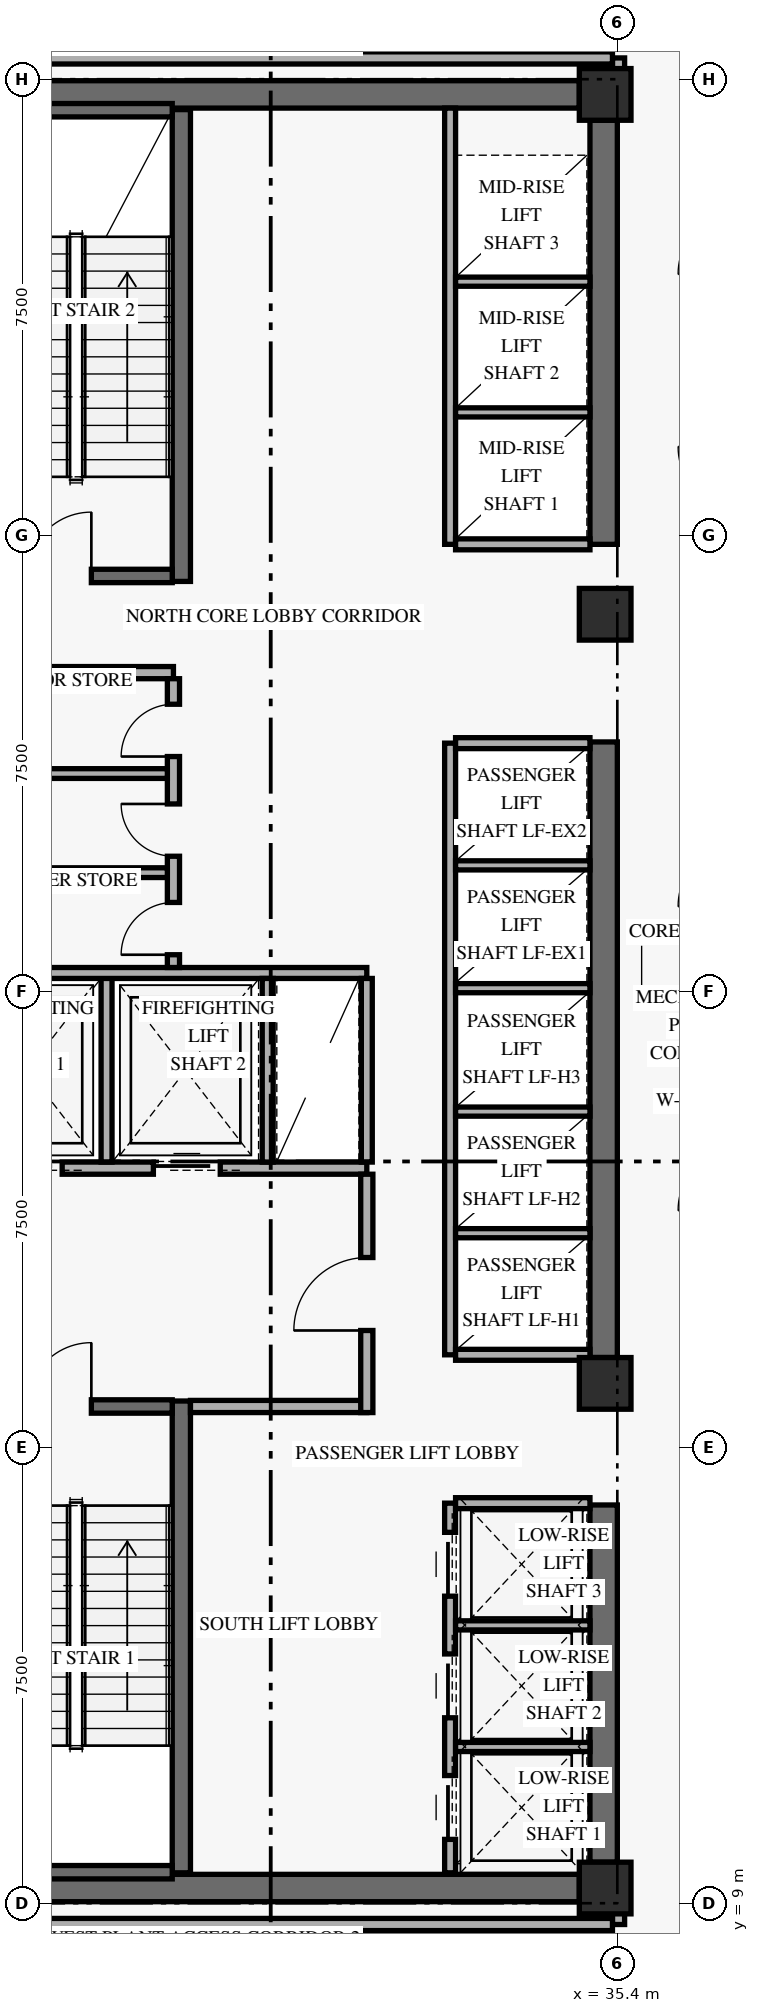
"""IFC4 building model, lengths in metres.
Left out: names, types, materials, properties, quantities, classifications, styles, units other than length and angle.
Written with IfcOpenShell. Run it as: python <this file> out.ifc"""

import sys

from ifc_helpers import new_model, si_unit, direction, frame, frame_2d, origin, origin_2d, place, context, subcontext, project, spatial, rectangle, extrude, element, fill, save


model = new_model("IFC4")
c1 = context("Model", 3, precision=1e-05, world=origin(), true_north=direction((0.0, 1.0)))
c2 = subcontext(c1, "Body", "Model", "MODEL_VIEW")
j1 = project(units=[si_unit("LENGTHUNIT", "METRE"), si_unit("PLANEANGLEUNIT", "RADIAN")], contexts=[c1])
p1 = place(None, origin())
s1 = spatial("IfcSite", under=j1, at=p1, CompositionType="ELEMENT")
p2 = place(p1, origin())
s2 = spatial("IfcBuilding", under=s1, at=p2, CompositionType="ELEMENT")
p3 = place(p2, frame((0.0, 0.0, 71.4)))
s3 = spatial("IfcBuildingStorey", under=s2, at=p3, CompositionType="ELEMENT", Elevation=71.4)
p4 = place(p3, frame((35.175, 9.675, 0.0), z_axis=(0.0, 0.0, 1.0), x_axis=(0.0, 1.0, 0.0)))
e1 = element("IfcWall", 1, at=p4, inside=s3, PredefinedType="SHEAR", context=c2, shape_type="SweptSolid", body=[
    extrude(rectangle(XDim=5.875, YDim=0.45, at=frame_2d((2.938, 0.0))), origin(), (0.0, 0.0, 1.0), 4.297),
])
p5 = place(p3, frame((35.175, 17.975, 0.0), z_axis=(0.0, 0.0, 1.0), x_axis=(0.0, 1.0, 0.0)))
e2 = element("IfcWall", 2, at=p5, inside=s3, PredefinedType="SHEAR", context=c2, shape_type="SweptSolid", body=[
    extrude(rectangle(XDim=10.125, YDim=0.45, at=frame_2d((5.062, 0.0))), origin(), (0.0, 0.0, 1.0), 4.297),
])
p6 = place(p3, frame((35.175, 31.35, 0.0), z_axis=(0.0, 0.0, 1.0), x_axis=(0.0, 1.0, 0.0)))
e3 = element("IfcWall", 3, at=p6, inside=s3, PredefinedType="SHEAR", context=c2, shape_type="SweptSolid", body=[
    extrude(rectangle(XDim=6.975, YDim=0.45, at=frame_2d((3.487, 0.0))), origin(), (0.0, 0.0, 1.0), 4.297),
])
for number, where, z_axis, x_axis in (
    (4, (24.625, 9.25, 0.0), (0.0, 0.0, 1.0), (1.0, 0.0, 0.0)),
    (5, (24.625, 38.75, 0.0), (0.0, 0.0, 1.0), (1.0, 0.0, 0.0)),
):
    element("IfcWall", number, at=place(p3, frame(where, z_axis=z_axis, x_axis=x_axis)), inside=s3, PredefinedType="SHEAR", context=c2, shape_type="SweptSolid", body=[
        extrude(rectangle(XDim=10.15, YDim=0.45, at=frame_2d((5.075, 0.0))), origin(), (0.0, 0.0, 1.0), 4.99),
    ])
p7 = place(p3, frame((28.23, 9.5, 0.0), z_axis=(0.0, 0.0, 1.0), x_axis=(0.0, 1.0, 0.0)))
e6 = element("IfcWall", 6, at=p7, inside=s3, PredefinedType="SHEAR", context=c2, shape_type="SweptSolid", body=[
    extrude(rectangle(XDim=7.76, YDim=0.3, at=frame_2d((3.88, 0.0))), origin(), (0.0, 0.0, 1.0), 4.99),
])
p8 = place(p3, frame((24.92, 9.51, 0.0), z_axis=(0.0, 0.0, 1.0), x_axis=(1.0, 0.0, 0.0)))
e7 = element("IfcWall", 7, at=p8, inside=s3, PredefinedType="SHEAR", context=c2, shape_type="SweptSolid", body=[
    extrude(rectangle(XDim=3.16, YDim=0.22, at=frame_2d((1.58, 0.0))), origin(), (0.0, 0.0, 1.0), 4.99),
])
p9 = place(p3, frame((24.92, 17.17, 0.0), z_axis=(0.0, 0.0, 1.0), x_axis=(1.0, 0.0, 0.0)))
e8 = element("IfcWall", 8, at=p9, inside=s3, PredefinedType="SHEAR", context=c2, shape_type="SweptSolid", body=[
    extrude(rectangle(XDim=3.16, YDim=0.22, at=frame_2d((1.58, 0.0))), origin(), (0.0, 0.0, 1.0), 4.99),
])
p10 = place(p9, frame((0.78, 0.0, 0.0)))
e9 = element("IfcOpeningElement", 9, at=p10, cuts=e8, PredefinedType="OPENING", context=c2, shape_type="SweptSolid", body=[
    extrude(rectangle(XDim=1.05, YDim=2.15, at=frame_2d((0.525, 1.075))), frame((0.0, 0.12, 0.0), z_axis=(0.0, -1.0, 0.0), x_axis=(1.0, 0.0, 0.0)), (0.0, 0.0, 1.0), 0.24),
])
p11 = place(p3, frame((28.23, 30.74, 0.0), z_axis=(0.0, 0.0, 1.0), x_axis=(0.0, 1.0, 0.0)))
e10 = element("IfcWall", 10, at=p11, inside=s3, PredefinedType="SHEAR", context=c2, shape_type="SweptSolid", body=[
    extrude(rectangle(XDim=7.76, YDim=0.3, at=frame_2d((3.88, 0.0))), origin(), (0.0, 0.0, 1.0), 4.99),
])
p12 = place(p3, frame((24.92, 30.83, 0.0), z_axis=(0.0, 0.0, 1.0), x_axis=(1.0, 0.0, 0.0)))
e11 = element("IfcWall", 11, at=p12, inside=s3, PredefinedType="SHEAR", context=c2, shape_type="SweptSolid", body=[
    extrude(rectangle(XDim=3.16, YDim=0.22, at=frame_2d((1.58, 0.0))), origin(), (0.0, 0.0, 1.0), 4.99),
])
p13 = place(p12, frame((0.78, 0.0, 0.0)))
e12 = element("IfcOpeningElement", 12, at=p13, cuts=e11, PredefinedType="OPENING", context=c2, shape_type="SweptSolid", body=[
    extrude(rectangle(XDim=1.05, YDim=2.15, at=frame_2d((0.525, 1.075))), frame((0.0, 0.12, 0.0), z_axis=(0.0, -1.0, 0.0), x_axis=(1.0, 0.0, 0.0)), (0.0, 0.0, 1.0), 0.24),
])
p14 = place(p3, frame((24.92, 38.49, 0.0), z_axis=(0.0, 0.0, 1.0), x_axis=(1.0, 0.0, 0.0)))
e13 = element("IfcWall", 13, at=p14, inside=s3, PredefinedType="SHEAR", context=c2, shape_type="SweptSolid", body=[
    extrude(rectangle(XDim=3.16, YDim=0.22, at=frame_2d((1.58, 0.0))), origin(), (0.0, 0.0, 1.0), 4.99),
])
for number, where, z_axis, x_axis in (
    (14, (35.2, 9.25, 0.0), (0.0, 0.0, 1.0), (1.0, 0.0, 0.0)),
    (15, (35.2, 17.55, 0.0), (0.0, 0.0, 1.0), (1.0, 0.0, 0.0)),
    (16, (35.2, 30.2, 0.0), (0.0, 0.0, 1.0), (1.0, 0.0, 0.0)),
    (17, (35.2, 38.75, 0.0), (0.0, 0.0, 1.0), (1.0, 0.0, 0.0)),
):
    element("IfcColumn", number, at=place(p3, frame(where, z_axis=z_axis, x_axis=x_axis)), inside=s3, PredefinedType="COLUMN", context=c2, shape_type="SweptSolid", body=[
        extrude(rectangle(XDim=0.85, YDim=0.85, at=origin_2d()), origin(), (0.0, 0.0, 1.0), 5.4),
    ])
p15 = place(p3, frame((24.45, 21.09, 0.0), z_axis=(0.0, 0.0, 1.0), x_axis=(1.0, 0.0, 0.0)))
e18 = element("IfcWall", 18, at=p15, inside=s3, PredefinedType="STANDARD", context=c2, shape_type="SweptSolid", body=[
    extrude(rectangle(XDim=6.83, YDim=0.2, at=frame_2d((3.415, 0.0))), origin(), (0.0, 0.0, 1.0), 4.99),
])
p16 = place(p15, frame((0.72, 0.0, 0.0)))
e19 = element("IfcOpeningElement", 19, at=p16, cuts=e18, PredefinedType="OPENING", context=c2, shape_type="SweptSolid", body=[
    extrude(rectangle(XDim=1.1, YDim=2.2, at=frame_2d((0.55, 1.1))), frame((0.0, 0.11, 0.0), z_axis=(0.0, -1.0, 0.0), x_axis=(1.0, 0.0, 0.0)), (0.0, 0.0, 1.0), 0.22),
])
p17 = place(p15, frame((3.32, 0.0, 0.0)))
e20 = element("IfcOpeningElement", 20, at=p17, cuts=e18, PredefinedType="OPENING", context=c2, shape_type="SweptSolid", body=[
    extrude(rectangle(XDim=1.1, YDim=2.2, at=frame_2d((0.55, 1.1))), frame((0.0, 0.11, 0.0), z_axis=(0.0, -1.0, 0.0), x_axis=(1.0, 0.0, 0.0)), (0.0, 0.0, 1.0), 0.22),
])
p18 = place(p3, frame((28.38, 17.17, 0.0), z_axis=(0.0, 0.0, 1.0), x_axis=(1.0, 0.0, 0.0)))
e21 = element("IfcWall", 21, at=p18, inside=s3, PredefinedType="STANDARD", context=c2, shape_type="SweptSolid", body=[
    extrude(rectangle(XDim=2.9, YDim=0.2, at=frame_2d((1.45, 0.0))), origin(), (0.0, 0.0, 1.0), 4.99),
])
p19 = place(p3, frame((31.28, 17.07, 0.0), z_axis=(0.0, 0.0, 1.0), x_axis=(0.0, 1.0, 0.0)))
e22 = element("IfcWall", 22, at=p19, inside=s3, PredefinedType="STANDARD", context=c2, shape_type="SweptSolid", body=[
    extrude(rectangle(XDim=3.92, YDim=0.2, at=frame_2d((1.96, 0.0))), origin(), (0.0, 0.0, 1.0), 4.279),
])
p20 = place(p19, frame((1.35, 0.0, 0.0)))
e23 = element("IfcOpeningElement", 23, at=p20, cuts=e22, PredefinedType="OPENING", context=c2, shape_type="SweptSolid", body=[
    extrude(rectangle(XDim=1.2, YDim=2.15, at=frame_2d((0.6, 1.075))), frame((0.0, 0.11, 0.0), z_axis=(0.0, -1.0, 0.0), x_axis=(1.0, 0.0, 0.0)), (0.0, 0.0, 1.0), 0.22),
])
p21 = place(p3, frame((27.0, 21.19, 0.0), z_axis=(0.0, 0.0, 1.0), x_axis=(0.0, 1.0, 0.0)))
e24 = element("IfcWall", 24, at=p21, inside=s3, PredefinedType="STANDARD", context=c2, shape_type="SweptSolid", body=[
    extrude(rectangle(XDim=3.11, YDim=0.18, at=frame_2d((1.555, 0.0))), origin(), (0.0, 0.0, 1.0), 4.99),
])
p22 = place(p3, frame((24.45, 24.3, 0.0), z_axis=(0.0, 0.0, 1.0), x_axis=(1.0, 0.0, 0.0)))
e25 = element("IfcWall", 25, at=p22, inside=s3, PredefinedType="STANDARD", context=c2, shape_type="SweptSolid", body=[
    extrude(rectangle(XDim=6.83, YDim=0.18, at=frame_2d((3.415, 0.0))), origin(), (0.0, 0.0, 1.0), 4.99),
])
for number, where, z_axis, x_axis in (
    (26, (29.65, 21.19, 0.0), (0.0, 0.0, 1.0), (0.0, 1.0, 0.0)),
    (27, (31.28, 21.19, 0.0), (0.0, 0.0, 1.0), (0.0, 1.0, 0.0)),
):
    element("IfcWall", number, at=place(p3, frame(where, z_axis=z_axis, x_axis=x_axis)), inside=s3, PredefinedType="STANDARD", context=c2, shape_type="SweptSolid", body=[
        extrude(rectangle(XDim=3.02, YDim=0.18, at=frame_2d((1.51, 0.0))), origin(), (0.0, 0.0, 1.0), 4.99),
    ])
p23 = place(p3, frame((24.45, 29.24, 0.0), z_axis=(0.0, 0.0, 1.0), x_axis=(1.0, 0.0, 0.0)))
e28 = element("IfcWall", 28, at=p23, inside=s3, PredefinedType="STANDARD", context=c2, shape_type="SweptSolid", body=[
    extrude(rectangle(XDim=3.65, YDim=0.2, at=frame_2d((1.825, 0.0))), origin(), (0.0, 0.0, 1.0), 4.99),
])
p24 = place(p3, frame((28.1, 24.39, 0.0), z_axis=(0.0, 0.0, 1.0), x_axis=(0.0, 1.0, 0.0)))
e29 = element("IfcWall", 29, at=p24, inside=s3, PredefinedType="STANDARD", context=c2, shape_type="SweptSolid", body=[
    extrude(rectangle(XDim=4.75, YDim=0.2, at=frame_2d((2.375, 0.0))), origin(), (0.0, 0.0, 1.0), 4.99),
])
p25 = place(p24, frame((0.21, 0.0, 0.0)))
e30 = element("IfcOpeningElement", 30, at=p25, cuts=e29, PredefinedType="OPENING", context=c2, shape_type="SweptSolid", body=[
    extrude(rectangle(XDim=0.86, YDim=2.1, at=frame_2d((0.43, 1.05))), frame((0.0, 0.11, 0.0), z_axis=(0.0, -1.0, 0.0), x_axis=(1.0, 0.0, 0.0)), (0.0, 0.0, 1.0), 0.22),
])
p26 = place(p24, frame((1.83, 0.0, 0.0)))
e31 = element("IfcOpeningElement", 31, at=p26, cuts=e29, PredefinedType="OPENING", context=c2, shape_type="SweptSolid", body=[
    extrude(rectangle(XDim=0.86, YDim=2.1, at=frame_2d((0.43, 1.05))), frame((0.0, 0.11, 0.0), z_axis=(0.0, -1.0, 0.0), x_axis=(1.0, 0.0, 0.0)), (0.0, 0.0, 1.0), 0.22),
])
p27 = place(p24, frame((3.47, 0.0, 0.0)))
e32 = element("IfcOpeningElement", 32, at=p27, cuts=e29, PredefinedType="OPENING", context=c2, shape_type="SweptSolid", body=[
    extrude(rectangle(XDim=0.86, YDim=2.1, at=frame_2d((0.43, 1.05))), frame((0.0, 0.11, 0.0), z_axis=(0.0, -1.0, 0.0), x_axis=(1.0, 0.0, 0.0)), (0.0, 0.0, 1.0), 0.22),
])
for number, where, z_axis, x_axis in (
    (33, (24.45, 25.95, 0.0), (0.0, 0.0, 1.0), (1.0, 0.0, 0.0)),
    (34, (24.45, 27.58, 0.0), (0.0, 0.0, 1.0), (1.0, 0.0, 0.0)),
):
    element("IfcWall", number, at=place(p3, frame(where, z_axis=z_axis, x_axis=x_axis)), inside=s3, PredefinedType="PARTITIONING", context=c2, shape_type="SweptSolid", body=[
        extrude(rectangle(XDim=3.55, YDim=0.16, at=frame_2d((1.775, 0.0))), origin(), (0.0, 0.0, 1.0), 4.99),
    ])
p28 = place(p3, frame((32.65, 9.5, 0.0), z_axis=(0.0, 0.0, 1.0), x_axis=(0.0, 1.0, 0.0)))
e35 = element("IfcWall", 35, at=p28, inside=s3, PredefinedType="STANDARD", context=c2, shape_type="SweptSolid", body=[
    extrude(rectangle(XDim=6.08, YDim=0.18, at=frame_2d((3.04, 0.0))), origin(), (0.0, 0.0, 1.0), 4.99),
])
p29 = place(p28, frame((0.55, 0.0, 0.0)))
e36 = element("IfcOpeningElement", 36, at=p29, cuts=e35, PredefinedType="OPENING", context=c2, shape_type="SweptSolid", body=[
    extrude(rectangle(XDim=1.05, YDim=2.2, at=frame_2d((0.525, 1.1))), frame((0.0, 0.1, 0.0), z_axis=(0.0, -1.0, 0.0), x_axis=(1.0, 0.0, 0.0)), (0.0, 0.0, 1.0), 0.2),
])
p30 = place(p28, frame((2.55, 0.0, 0.0)))
e37 = element("IfcOpeningElement", 37, at=p30, cuts=e35, PredefinedType="OPENING", context=c2, shape_type="SweptSolid", body=[
    extrude(rectangle(XDim=1.05, YDim=2.2, at=frame_2d((0.525, 1.1))), frame((0.0, 0.1, 0.0), z_axis=(0.0, -1.0, 0.0), x_axis=(1.0, 0.0, 0.0)), (0.0, 0.0, 1.0), 0.2),
])
p31 = place(p28, frame((4.55, 0.0, 0.0)))
e38 = element("IfcOpeningElement", 38, at=p31, cuts=e35, PredefinedType="OPENING", context=c2, shape_type="SweptSolid", body=[
    extrude(rectangle(XDim=1.05, YDim=2.2, at=frame_2d((0.525, 1.1))), frame((0.0, 0.1, 0.0), z_axis=(0.0, -1.0, 0.0), x_axis=(1.0, 0.0, 0.0)), (0.0, 0.0, 1.0), 0.2),
])
p32 = place(p3, frame((32.74, 15.58, 0.0), z_axis=(0.0, 0.0, 1.0), x_axis=(1.0, 0.0, 0.0)))
e39 = element("IfcWall", 39, at=p32, inside=s3, PredefinedType="STANDARD", context=c2, shape_type="SweptSolid", body=[
    extrude(rectangle(XDim=2.21, YDim=0.18, at=frame_2d((1.105, 0.0))), origin(), (0.0, 0.0, 1.0), 4.99),
])
for number, where, z_axis, x_axis in (
    (40, (32.74, 11.57, 0.0), (0.0, 0.0, 1.0), (1.0, 0.0, 0.0)),
    (41, (32.74, 13.57, 0.0), (0.0, 0.0, 1.0), (1.0, 0.0, 0.0)),
):
    element("IfcWall", number, at=place(p3, frame(where, z_axis=z_axis, x_axis=x_axis)), inside=s3, PredefinedType="STANDARD", context=c2, shape_type="SweptSolid", body=[
        extrude(rectangle(XDim=2.21, YDim=0.15, at=frame_2d((1.105, 0.0))), origin(), (0.0, 0.0, 1.0), 4.99),
    ])
p33 = place(p3, frame((32.65, 18.02, 0.0), z_axis=(0.0, 0.0, 1.0), x_axis=(0.0, 1.0, 0.0)))
e42 = element("IfcWall", 42, at=p33, inside=s3, PredefinedType="STANDARD", context=c2, shape_type="SweptSolid", body=[
    extrude(rectangle(XDim=10.06, YDim=0.18, at=frame_2d((5.03, 0.0))), origin(), (0.0, 0.0, 1.0), 4.99),
])
for number, where, z_axis, x_axis in (
    (43, (32.74, 18.02, 0.0), (0.0, 0.0, 1.0), (1.0, 0.0, 0.0)),
    (44, (32.74, 28.08, 0.0), (0.0, 0.0, 1.0), (1.0, 0.0, 0.0)),
):
    element("IfcWall", number, at=place(p3, frame(where, z_axis=z_axis, x_axis=x_axis)), inside=s3, PredefinedType="STANDARD", context=c2, shape_type="SweptSolid", body=[
        extrude(rectangle(XDim=2.21, YDim=0.18, at=frame_2d((1.105, 0.0))), origin(), (0.0, 0.0, 1.0), 4.99),
    ])
for number, where, z_axis, x_axis in (
    (45, (32.74, 20.02, 0.0), (0.0, 0.0, 1.0), (1.0, 0.0, 0.0)),
    (46, (32.74, 22.02, 0.0), (0.0, 0.0, 1.0), (1.0, 0.0, 0.0)),
    (47, (32.74, 24.05, 0.0), (0.0, 0.0, 1.0), (1.0, 0.0, 0.0)),
    (48, (32.74, 26.07, 0.0), (0.0, 0.0, 1.0), (1.0, 0.0, 0.0)),
):
    element("IfcWall", number, at=place(p3, frame(where, z_axis=z_axis, x_axis=x_axis)), inside=s3, PredefinedType="STANDARD", context=c2, shape_type="SweptSolid", body=[
        extrude(rectangle(XDim=2.21, YDim=0.15, at=frame_2d((1.105, 0.0))), origin(), (0.0, 0.0, 1.0), 4.99),
    ])
p34 = place(p3, frame((32.65, 31.35, 0.0), z_axis=(0.0, 0.0, 1.0), x_axis=(0.0, 1.0, 0.0)))
e49 = element("IfcWall", 49, at=p34, inside=s3, PredefinedType="STANDARD", context=c2, shape_type="SweptSolid", body=[
    extrude(rectangle(XDim=7.175, YDim=0.18, at=frame_2d((3.587, 0.0))), origin(), (0.0, 0.0, 1.0), 4.99),
])
p35 = place(p3, frame((32.74, 31.35, 0.0), z_axis=(0.0, 0.0, 1.0), x_axis=(1.0, 0.0, 0.0)))
e50 = element("IfcWall", 50, at=p35, inside=s3, PredefinedType="STANDARD", context=c2, shape_type="SweptSolid", body=[
    extrude(rectangle(XDim=2.21, YDim=0.18, at=frame_2d((1.105, 0.0))), origin(), (0.0, 0.0, 1.0), 4.99),
])
for number, where, z_axis, x_axis in (
    (51, (32.74, 33.52, 0.0), (0.0, 0.0, 1.0), (1.0, 0.0, 0.0)),
    (52, (32.74, 35.67, 0.0), (0.0, 0.0, 1.0), (1.0, 0.0, 0.0)),
):
    element("IfcWall", number, at=place(p3, frame(where, z_axis=z_axis, x_axis=x_axis)), inside=s3, PredefinedType="STANDARD", context=c2, shape_type="SweptSolid", body=[
        extrude(rectangle(XDim=2.21, YDim=0.15, at=frame_2d((1.105, 0.0))), origin(), (0.0, 0.0, 1.0), 4.99),
    ])
for number, where, z_axis, x_axis in (
    (53, (35.42, 8.65, 0.0), (0.0, 0.0, 1.0), (0.0, 1.0, 0.0)),
    (54, (35.42, 38.75, 0.0), (0.0, 0.0, 1.0), (0.0, 1.0, 0.0)),
):
    element("IfcWall", number, at=place(p3, frame(where, z_axis=z_axis, x_axis=x_axis)), inside=s3, PredefinedType="STANDARD", context=c2, shape_type="SweptSolid", body=[
        extrude(rectangle(XDim=0.6, YDim=0.2, at=frame_2d((0.3, 0.0))), origin(), (0.0, 0.0, 1.0), 4.279),
    ])
for number, where, z_axis, x_axis in (
    (55, (23.85, 39.35, 0.0), (0.0, 0.0, 1.0), (1.0, 0.0, 0.0)),
    (56, (23.85, 8.65, 0.0), (0.0, 0.0, 1.0), (1.0, 0.0, 0.0)),
):
    element("IfcWall", number, at=place(p3, frame(where, z_axis=z_axis, x_axis=x_axis)), inside=s3, PredefinedType="STANDARD", context=c2, shape_type="SweptSolid", body=[
        extrude(rectangle(XDim=11.47, YDim=0.2, at=frame_2d((5.735, 0.0))), origin(), (0.0, 0.0, 1.0), 4.279),
    ])
p36 = place(p10, frame((1.05, 0.0, 0.0), z_axis=(0.0, 0.0, 1.0), x_axis=(-1.0, 0.0, 0.0)))
e57 = element("IfcDoor", 57, at=p36, inside=s3, OperationType="SINGLE_SWING_LEFT", PredefinedType="DOOR", context=c2, shape_type="SweptSolid", body=[
    extrude(rectangle(XDim=1.05, YDim=2.15, at=frame_2d((0.525, 1.075))), frame((0.0, 0.025, 0.0), z_axis=(0.0, -1.0, 0.0), x_axis=(1.0, 0.0, 0.0)), (0.0, 0.0, 1.0), 0.05),
])
fill(e9, e57)
p37 = place(p13, origin())
e58 = element("IfcDoor", 58, at=p37, inside=s3, OperationType="SINGLE_SWING_RIGHT", PredefinedType="DOOR", context=c2, shape_type="SweptSolid", body=[
    extrude(rectangle(XDim=1.05, YDim=2.15, at=frame_2d((0.525, 1.075))), frame((0.0, 0.025, 0.0), z_axis=(0.0, -1.0, 0.0), x_axis=(1.0, 0.0, 0.0)), (0.0, 0.0, 1.0), 0.05),
])
fill(e12, e58)
p38 = place(p16, origin())
e59 = element("IfcDoor", 59, at=p38, inside=s3, OperationType="SLIDING_TO_LEFT", PredefinedType="DOOR", context=c2, shape_type="SweptSolid", body=[
    extrude(rectangle(XDim=1.1, YDim=2.2, at=frame_2d((0.55, 1.1))), frame((0.0, 0.025, 0.0), z_axis=(0.0, -1.0, 0.0), x_axis=(1.0, 0.0, 0.0)), (0.0, 0.0, 1.0), 0.05),
])
fill(e19, e59)
p39 = place(p17, origin())
e60 = element("IfcDoor", 60, at=p39, inside=s3, OperationType="SLIDING_TO_LEFT", PredefinedType="DOOR", context=c2, shape_type="SweptSolid", body=[
    extrude(rectangle(XDim=1.1, YDim=2.2, at=frame_2d((0.55, 1.1))), frame((0.0, 0.025, 0.0), z_axis=(0.0, -1.0, 0.0), x_axis=(1.0, 0.0, 0.0)), (0.0, 0.0, 1.0), 0.05),
])
fill(e20, e60)
p40 = place(p20, origin())
e61 = element("IfcDoor", 61, at=p40, inside=s3, OperationType="SINGLE_SWING_LEFT", PredefinedType="DOOR", context=c2, shape_type="SweptSolid", body=[
    extrude(rectangle(XDim=1.2, YDim=2.15, at=frame_2d((0.6, 1.075))), frame((0.0, 0.025, 0.0), z_axis=(0.0, -1.0, 0.0), x_axis=(1.0, 0.0, 0.0)), (0.0, 0.0, 1.0), 0.05),
])
fill(e23, e61)
p41 = place(p25, origin())
e62 = element("IfcDoor", 62, at=p41, inside=s3, OperationType="SINGLE_SWING_LEFT", PredefinedType="DOOR", context=c2, shape_type="SweptSolid", body=[
    extrude(rectangle(XDim=0.86, YDim=2.1, at=frame_2d((0.43, 1.05))), frame((0.0, 0.025, 0.0), z_axis=(0.0, -1.0, 0.0), x_axis=(1.0, 0.0, 0.0)), (0.0, 0.0, 1.0), 0.05),
])
fill(e30, e62)
p42 = place(p26, origin())
e63 = element("IfcDoor", 63, at=p42, inside=s3, OperationType="SINGLE_SWING_RIGHT", PredefinedType="DOOR", context=c2, shape_type="SweptSolid", body=[
    extrude(rectangle(XDim=0.86, YDim=2.1, at=frame_2d((0.43, 1.05))), frame((0.0, 0.025, 0.0), z_axis=(0.0, -1.0, 0.0), x_axis=(1.0, 0.0, 0.0)), (0.0, 0.0, 1.0), 0.05),
])
fill(e31, e63)
p43 = place(p27, origin())
e64 = element("IfcDoor", 64, at=p43, inside=s3, OperationType="SINGLE_SWING_LEFT", PredefinedType="DOOR", context=c2, shape_type="SweptSolid", body=[
    extrude(rectangle(XDim=0.86, YDim=2.1, at=frame_2d((0.43, 1.05))), frame((0.0, 0.025, 0.0), z_axis=(0.0, -1.0, 0.0), x_axis=(1.0, 0.0, 0.0)), (0.0, 0.0, 1.0), 0.05),
])
fill(e32, e64)
p44 = place(p29, origin())
e65 = element("IfcDoor", 65, at=p44, inside=s3, OperationType="SLIDING_TO_LEFT", PredefinedType="DOOR", context=c2, shape_type="SweptSolid", body=[
    extrude(rectangle(XDim=1.05, YDim=2.2, at=frame_2d((0.525, 1.1))), frame((0.0, 0.025, 0.0), z_axis=(0.0, -1.0, 0.0), x_axis=(1.0, 0.0, 0.0)), (0.0, 0.0, 1.0), 0.05),
])
fill(e36, e65)
p45 = place(p30, origin())
e66 = element("IfcDoor", 66, at=p45, inside=s3, OperationType="SLIDING_TO_LEFT", PredefinedType="DOOR", context=c2, shape_type="SweptSolid", body=[
    extrude(rectangle(XDim=1.05, YDim=2.2, at=frame_2d((0.525, 1.1))), frame((0.0, 0.025, 0.0), z_axis=(0.0, -1.0, 0.0), x_axis=(1.0, 0.0, 0.0)), (0.0, 0.0, 1.0), 0.05),
])
fill(e37, e66)
p46 = place(p31, origin())
e67 = element("IfcDoor", 67, at=p46, inside=s3, OperationType="SLIDING_TO_LEFT", PredefinedType="DOOR", context=c2, shape_type="SweptSolid", body=[
    extrude(rectangle(XDim=1.05, YDim=2.2, at=frame_2d((0.525, 1.1))), frame((0.0, 0.025, 0.0), z_axis=(0.0, -1.0, 0.0), x_axis=(1.0, 0.0, 0.0)), (0.0, 0.0, 1.0), 0.05),
])
fill(e38, e67)
save(model, sys.argv[1])
